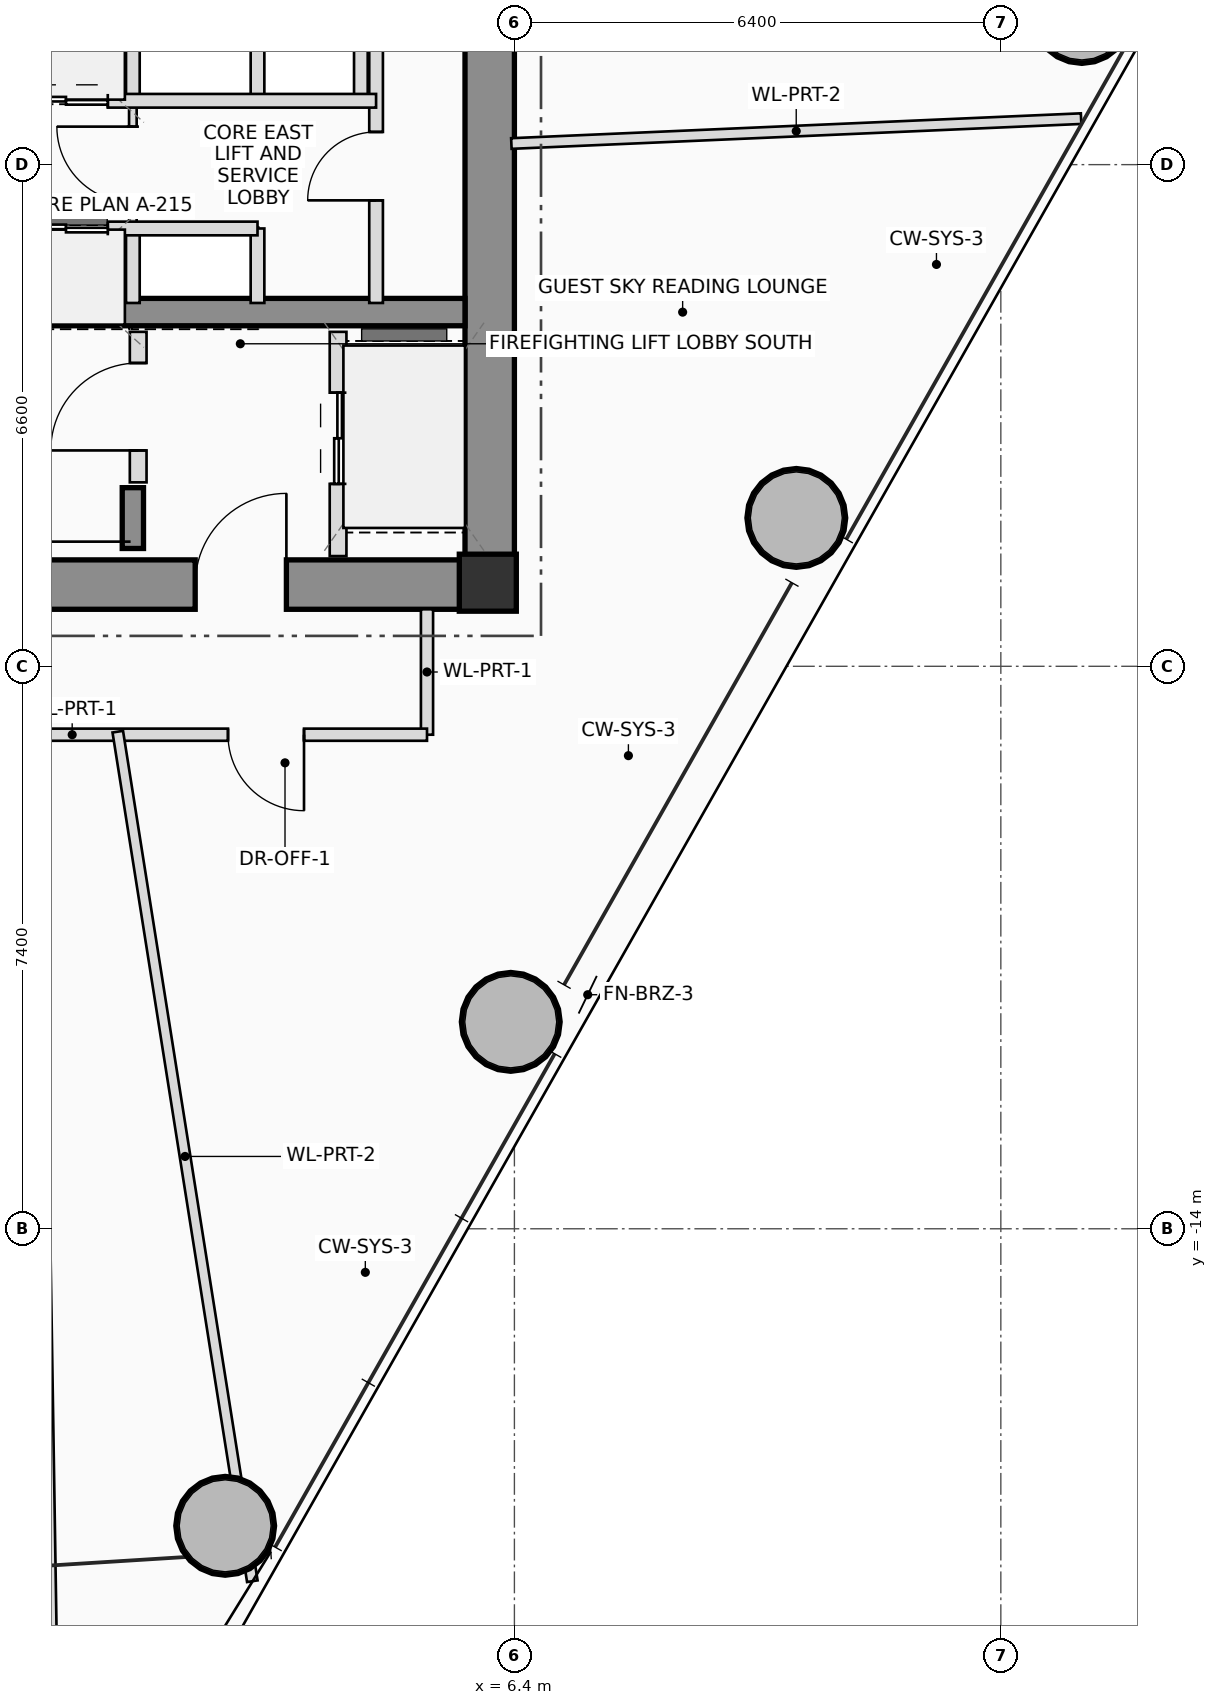
"""IFC4 building model, lengths in metres.
Left out: names, types, materials, properties, quantities, classifications, styles, units other than length and angle.
Written with IfcOpenShell. Run it as: python <this file> out.ifc"""

import sys

from ifc_helpers import new_model, si_unit, direction, frame, frame_2d, origin, origin_2d, place, context, subcontext, project, spatial, rectangle, hollow_circle, extrude, source, transform, mapped, element, fill, save


model = new_model("IFC4")
c1 = context("Model", 3, precision=1e-05, world=origin(), true_north=direction((0.0, 1.0)))
c2 = subcontext(c1, "Body", "Model", "MODEL_VIEW")
j1 = project(units=[si_unit("LENGTHUNIT", "METRE"), si_unit("PLANEANGLEUNIT", "RADIAN")], contexts=[c1])
p1 = place(None, origin())
s1 = spatial("IfcSite", under=j1, at=p1, CompositionType="ELEMENT")
p2 = place(p1, origin())
s2 = spatial("IfcBuilding", under=s1, at=p2, CompositionType="ELEMENT")
p3 = place(p2, frame((0.0, 0.0, 165.65)))
s3 = spatial("IfcBuildingStorey", under=s2, at=p3, CompositionType="ELEMENT", Elevation=165.65)
m1 = source(origin(), c2, "Body", "SweptSolid", [
    extrude(rectangle(XDim=0.75, YDim=0.75, at=origin_2d()), origin(), (0.0, 0.0, 1.0), 3.45),
])
p4 = place(p3, frame((6.05, -5.5, 0.0), z_axis=(0.0, 0.0, 1.0), x_axis=(1.0, 0.0, 0.0)))
e1 = element("IfcColumn", 1, at=p4, inside=s3, PredefinedType="COLUMN", context=c2, shape_type="MappedRepresentation", body=[
    mapped(m1, transform((0.0, 0.0, 0.0), scale=1.0)),
])
p5 = place(p3, frame((-6.4, -5.525, 0.0), z_axis=(0.0, 0.0, 1.0), x_axis=(1.0, 0.0, 0.0)))
e2 = element("IfcWall", 2, at=p5, inside=s3, PredefinedType="SHEAR", context=c2, shape_type="SweptSolid", body=[
    extrude(rectangle(XDim=12.8, YDim=0.65, at=frame_2d((6.4, 0.0))), origin(), (0.0, 0.0, 1.0), 3.45),
])
p6 = place(p5, frame((8.6, 0.0, 0.0)))
e3 = element("IfcOpeningElement", 3, at=p6, cuts=e2, PredefinedType="OPENING", context=c2, shape_type="SweptSolid", body=[
    extrude(rectangle(XDim=1.2, YDim=2.2, at=frame_2d((0.6, 1.1))), frame((0.0, 0.335, 0.0), z_axis=(0.0, -1.0, 0.0), x_axis=(1.0, 0.0, 0.0)), (0.0, 0.0, 1.0), 0.67),
])
p7 = place(p3, frame((6.075, -5.2, 0.0), z_axis=(0.0, 0.0, 1.0), x_axis=(0.0, 1.0, 0.0)))
e4 = element("IfcWall", 4, at=p7, inside=s3, PredefinedType="SHEAR", context=c2, shape_type="SweptSolid", body=[
    extrude(rectangle(XDim=10.4, YDim=0.65, at=frame_2d((5.2, 0.0))), origin(), (0.0, 0.0, 1.0), 3.45),
])
p8 = place(p3, frame((-5.75, -1.94, 0.0), z_axis=(0.0, 0.0, 1.0), x_axis=(1.0, 0.0, 0.0)))
e5 = element("IfcWall", 5, at=p8, inside=s3, PredefinedType="SHEAR", context=c2, shape_type="SweptSolid", body=[
    extrude(rectangle(XDim=11.5, YDim=0.36, at=frame_2d((5.75, 0.0))), origin(), (0.0, 0.0, 1.0), 3.45),
])
p9 = place(p3, frame((1.38, -5.05, 0.0), z_axis=(0.0, 0.0, 1.0), x_axis=(0.0, 1.0, 0.0)))
e6 = element("IfcWall", 6, at=p9, inside=s3, PredefinedType="SHEAR", context=c2, shape_type="SweptSolid", body=[
    extrude(rectangle(XDim=0.8, YDim=0.28, at=frame_2d((0.4, 0.0))), origin(), (0.0, 0.0, 1.0), 3.45),
])
m2 = source(origin(), c2, "Body", "SweptSolid", [
    extrude(hollow_circle(Radius=0.65, WallThickness=0.045, at=origin_2d()), origin(), (0.0, 0.0, 1.0), 3.45),
])
for number, where, z_axis, x_axis in (
    (7, (2.595, -17.908, 0.0), (0.0, 0.0, 1.0), (1.0, 0.0, 0.0)),
    (8, (6.352, -11.278, 0.0), (0.0, 0.0, 1.0), (1.0, 0.0, 0.0)),
    (9, (10.109, -4.648, 0.0), (0.0, 0.0, 1.0), (1.0, 0.0, 0.0)),
    (10, (13.866, 1.982, 0.0), (0.0, 0.0, 1.0), (1.0, 0.0, 0.0)),
):
    element("IfcColumn", number, at=place(p3, frame(where, z_axis=z_axis, x_axis=x_axis)), inside=s3, PredefinedType="COLUMN", context=c2, shape_type="MappedRepresentation", body=[
        mapped(m2, transform((0.0, 0.0, 0.0), scale=1.0)),
    ])
p10 = place(p3, frame((1.45, -4.18, 0.0), z_axis=(0.0, 0.0, 1.0), x_axis=(0.0, 1.0, 0.0)))
e11 = element("IfcWall", 11, at=p10, inside=s3, PredefinedType="PLUMBINGWALL", context=c2, shape_type="SweptSolid", body=[
    extrude(rectangle(XDim=1.98, YDim=0.22, at=frame_2d((0.99, 0.0))), origin(), (0.0, 0.0, 1.0), 3.25),
])
p11 = place(p10, frame((0.42, 0.0, 0.0)))
e12 = element("IfcOpeningElement", 12, at=p11, cuts=e11, PredefinedType="OPENING", context=c2, shape_type="SweptSolid", body=[
    extrude(rectangle(XDim=1.15, YDim=2.15, at=frame_2d((0.575, 1.075))), frame((0.0, 0.12, 0.0), z_axis=(0.0, -1.0, 0.0), x_axis=(1.0, 0.0, 0.0)), (0.0, 0.0, 1.0), 0.24),
])
p12 = place(p3, frame((4.08, -5.15, 0.0), z_axis=(0.0, 0.0, 1.0), x_axis=(0.0, 1.0, 0.0)))
e13 = element("IfcWall", 13, at=p12, inside=s3, PredefinedType="PLUMBINGWALL", context=c2, shape_type="SweptSolid", body=[
    extrude(rectangle(XDim=2.95, YDim=0.22, at=frame_2d((1.475, 0.0))), origin(), (0.0, 0.0, 1.0), 3.25),
])
p13 = place(p12, frame((0.95, 0.0, 0.0)))
e14 = element("IfcOpeningElement", 14, at=p13, cuts=e13, PredefinedType="OPENING", context=c2, shape_type="SweptSolid", body=[
    extrude(rectangle(XDim=1.2, YDim=2.25, at=frame_2d((0.6, 1.125))), frame((0.0, 0.12, 0.0), z_axis=(0.0, -1.0, 0.0), x_axis=(1.0, 0.0, 0.0)), (0.0, 0.0, 1.0), 0.24),
])
p14 = place(p3, frame((1.38, -0.84, 0.0), z_axis=(0.0, 0.0, 1.0), x_axis=(0.0, 1.0, 0.0)))
e15 = element("IfcWall", 15, at=p14, inside=s3, PredefinedType="PARTITIONING", context=c2, shape_type="SweptSolid", body=[
    extrude(rectangle(XDim=1.68, YDim=0.1, at=frame_2d((0.84, 0.0))), origin(), (0.0, 0.0, 1.0), 3.25),
])
p15 = place(p14, frame((0.34, 0.0, 0.0)))
e16 = element("IfcOpeningElement", 16, at=p15, cuts=e15, PredefinedType="OPENING", context=c2, shape_type="SweptSolid", body=[
    extrude(rectangle(XDim=1.0, YDim=2.25, at=frame_2d((0.5, 1.125))), frame((0.0, 0.06, 0.0), z_axis=(0.0, -1.0, 0.0), x_axis=(1.0, 0.0, 0.0)), (0.0, 0.0, 1.0), 0.12),
])
for number, where, z_axis, x_axis in (
    (17, (1.38, 0.84, 0.0), (0.0, 0.0, 1.0), (0.0, 1.0, 0.0)),
    (18, (1.38, -1.82, 0.0), (0.0, 0.0, 1.0), (0.0, 1.0, 0.0)),
    (19, (3.02, 0.84, 0.0), (0.0, 0.0, 1.0), (0.0, 1.0, 0.0)),
    (20, (4.38, 0.84, 0.0), (0.0, 0.0, 1.0), (0.0, 1.0, 0.0)),
    (21, (3.02, -1.82, 0.0), (0.0, 0.0, 1.0), (0.0, 1.0, 0.0)),
):
    element("IfcWall", number, at=place(p3, frame(where, z_axis=z_axis, x_axis=x_axis)), inside=s3, PredefinedType="PLUMBINGWALL", context=c2, shape_type="SweptSolid", body=[
        extrude(rectangle(XDim=0.98, YDim=0.18, at=frame_2d((0.49, 0.0))), origin(), (0.0, 0.0, 1.0), 3.25),
    ])
p16 = place(p3, frame((4.58, -1.82, 0.0), z_axis=(0.0, 0.0, 1.0), x_axis=(0.0, 1.0, 0.0)))
e22 = element("IfcWall", 22, at=p16, inside=s3, PredefinedType="PLUMBINGWALL", context=c2, shape_type="SweptSolid", body=[
    extrude(rectangle(XDim=3.64, YDim=0.18, at=frame_2d((1.82, 0.0))), origin(), (0.0, 0.0, 1.0), 3.25),
])
p17 = place(p16, frame((1.35, 0.0, 0.0)))
e23 = element("IfcOpeningElement", 23, at=p17, cuts=e22, PredefinedType="OPENING", context=c2, shape_type="SweptSolid", body=[
    extrude(rectangle(XDim=0.9, YDim=2.05, at=frame_2d((0.45, 1.025))), frame((0.0, 0.1, 0.0), z_axis=(0.0, -1.0, 0.0), x_axis=(1.0, 0.0, 0.0)), (0.0, 0.0, 1.0), 0.2),
])
p18 = place(p3, frame((-5.68, 0.84, 0.0), z_axis=(0.0, 0.0, 1.0), x_axis=(1.0, 0.0, 0.0)))
e24 = element("IfcWall", 24, at=p18, inside=s3, PredefinedType="PLUMBINGWALL", context=c2, shape_type="SweptSolid", body=[
    extrude(rectangle(XDim=10.26, YDim=0.18, at=frame_2d((5.13, 0.0))), origin(), (0.0, 0.0, 1.0), 3.25),
])
p19 = place(p18, frame((1.08, 0.0, 0.0)))
e25 = element("IfcOpeningElement", 25, at=p19, cuts=e24, PredefinedType="OPENING", context=c2, shape_type="SweptSolid", body=[
    extrude(rectangle(XDim=0.9, YDim=2.05, at=frame_2d((0.45, 1.025))), frame((0.0, 0.1, 0.0), z_axis=(0.0, -1.0, 0.0), x_axis=(1.0, 0.0, 0.0)), (0.0, 0.0, 1.0), 0.2),
])
p20 = place(p18, frame((3.93, 0.0, 0.0)))
e26 = element("IfcOpeningElement", 26, at=p20, cuts=e24, PredefinedType="OPENING", context=c2, shape_type="SweptSolid", body=[
    extrude(rectangle(XDim=1.1, YDim=2.2, at=frame_2d((0.55, 1.1))), frame((0.0, 0.1, 0.0), z_axis=(0.0, -1.0, 0.0), x_axis=(1.0, 0.0, 0.0)), (0.0, 0.0, 1.0), 0.2),
])
p21 = place(p18, frame((5.63, 0.0, 0.0)))
e27 = element("IfcOpeningElement", 27, at=p21, cuts=e24, PredefinedType="OPENING", context=c2, shape_type="SweptSolid", body=[
    extrude(rectangle(XDim=1.1, YDim=2.2, at=frame_2d((0.55, 1.1))), frame((0.0, 0.1, 0.0), z_axis=(0.0, -1.0, 0.0), x_axis=(1.0, 0.0, 0.0)), (0.0, 0.0, 1.0), 0.2),
])
p22 = place(p3, frame((-5.68, -0.84, 0.0), z_axis=(0.0, 0.0, 1.0), x_axis=(1.0, 0.0, 0.0)))
e28 = element("IfcWall", 28, at=p22, inside=s3, PredefinedType="PLUMBINGWALL", context=c2, shape_type="SweptSolid", body=[
    extrude(rectangle(XDim=8.7, YDim=0.18, at=frame_2d((4.35, 0.0))), origin(), (0.0, 0.0, 1.0), 3.25),
])
p23 = place(p22, frame((1.68, 0.0, 0.0)))
e29 = element("IfcOpeningElement", 29, at=p23, cuts=e28, PredefinedType="OPENING", context=c2, shape_type="SweptSolid", body=[
    extrude(rectangle(XDim=0.9, YDim=2.05, at=frame_2d((0.45, 1.025))), frame((0.0, 0.1, 0.0), z_axis=(0.0, -1.0, 0.0), x_axis=(1.0, 0.0, 0.0)), (0.0, 0.0, 1.0), 0.2),
])
p24 = place(p22, frame((3.93, 0.0, 0.0)))
e30 = element("IfcOpeningElement", 30, at=p24, cuts=e28, PredefinedType="OPENING", context=c2, shape_type="SweptSolid", body=[
    extrude(rectangle(XDim=1.1, YDim=2.2, at=frame_2d((0.55, 1.1))), frame((0.0, 0.1, 0.0), z_axis=(0.0, -1.0, 0.0), x_axis=(1.0, 0.0, 0.0)), (0.0, 0.0, 1.0), 0.2),
])
p25 = place(p22, frame((5.63, 0.0, 0.0)))
e31 = element("IfcOpeningElement", 31, at=p25, cuts=e28, PredefinedType="OPENING", context=c2, shape_type="SweptSolid", body=[
    extrude(rectangle(XDim=1.1, YDim=2.2, at=frame_2d((0.55, 1.1))), frame((0.0, 0.1, 0.0), z_axis=(0.0, -1.0, 0.0), x_axis=(1.0, 0.0, 0.0)), (0.0, 0.0, 1.0), 0.2),
])
p26 = place(p3, frame((5.25, -5.85, 0.0), z_axis=(0.0, 0.0, 1.0), x_axis=(0.0, -1.0, 0.0)))
e32 = element("IfcWall", 32, at=p26, inside=s3, PredefinedType="PARTITIONING", context=c2, shape_type="SweptSolid", body=[
    extrude(rectangle(XDim=1.65, YDim=0.16, at=frame_2d((0.825, 0.0))), origin(), (0.0, 0.0, 1.0), 3.25),
])
p27 = place(p3, frame((5.25, -7.5, 0.0), z_axis=(0.0, 0.0, 1.0), x_axis=(-1.0, 0.0, 0.0)))
e33 = element("IfcWall", 33, at=p27, inside=s3, PredefinedType="PARTITIONING", context=c2, shape_type="SweptSolid", body=[
    extrude(rectangle(XDim=11.61, YDim=0.16, at=frame_2d((5.805, 0.0))), origin(), (0.0, 0.0, 1.0), 2.605),
])
p28 = place(p27, frame((1.618, 0.0, 0.0)))
e34 = element("IfcOpeningElement", 34, at=p28, cuts=e33, PredefinedType="OPENING", context=c2, shape_type="SweptSolid", body=[
    extrude(rectangle(XDim=1.0, YDim=2.25, at=frame_2d((0.5, 1.125))), frame((0.0, 0.09, 0.0), z_axis=(0.0, -1.0, 0.0), x_axis=(1.0, 0.0, 0.0)), (0.0, 0.0, 1.0), 0.18),
])
p29 = place(p27, frame((6.719, 0.0, 0.0)))
e35 = element("IfcOpeningElement", 35, at=p29, cuts=e33, PredefinedType="OPENING", context=c2, shape_type="SweptSolid", body=[
    extrude(rectangle(XDim=1.0, YDim=2.25, at=frame_2d((0.5, 1.125))), frame((0.0, 0.09, 0.0), z_axis=(0.0, -1.0, 0.0), x_axis=(1.0, 0.0, 0.0)), (0.0, 0.0, 1.0), 0.18),
])
p30 = place(p3, frame((6.36, 0.278, 0.0), z_axis=(0.0, 0.0, 1.0), x_axis=(0.999047543566, 0.043634913719, 0.0)))
e36 = element("IfcWall", 36, at=p30, inside=s3, PredefinedType="PARTITIONING", context=c2, shape_type="SweptSolid", body=[
    extrude(rectangle(XDim=7.503, YDim=0.14, at=frame_2d((3.751, 0.0))), origin(), (0.0, 0.0, 1.0), 2.605),
])
p31 = place(p3, frame((0.118, -7.46, 0.0), z_axis=(0.0, 0.0, 1.0), x_axis=(0.015859383496, -0.999874232069, 0.0)))
e37 = element("IfcWall", 37, at=p31, inside=s3, PredefinedType="PARTITIONING", context=c2, shape_type="SweptSolid", body=[
    extrude(rectangle(XDim=13.655, YDim=0.14, at=frame_2d((6.827, 0.0))), origin(), (0.0, 0.0, 1.0), 2.765),
])
p32 = place(p3, frame((1.181, -7.46, 0.0), z_axis=(0.0, 0.0, 1.0), x_axis=(0.156458885844, -0.98768447241, 0.0)))
e38 = element("IfcWall", 38, at=p32, inside=s3, PredefinedType="PARTITIONING", context=c2, shape_type="SweptSolid", body=[
    extrude(rectangle(XDim=11.316, YDim=0.14, at=frame_2d((5.658, 0.0))), origin(), (0.0, 0.0, 1.0), 2.605),
])
p33 = place(p6, origin())
e39 = element("IfcDoor", 39, at=p33, inside=s3, OperationType="SINGLE_SWING_RIGHT", PredefinedType="DOOR", context=c2, shape_type="SweptSolid", body=[
    extrude(rectangle(XDim=1.2, YDim=2.2, at=frame_2d((0.6, 1.1))), frame((0.0, 0.025, 0.0), z_axis=(0.0, -1.0, 0.0), x_axis=(1.0, 0.0, 0.0)), (0.0, 0.0, 1.0), 0.05),
])
fill(e3, e39)
p34 = place(p11, origin())
e40 = element("IfcDoor", 40, at=p34, inside=s3, OperationType="SINGLE_SWING_LEFT", PredefinedType="DOOR", context=c2, shape_type="SweptSolid", body=[
    extrude(rectangle(XDim=1.15, YDim=2.15, at=frame_2d((0.575, 1.075))), frame((0.0, 0.025, 0.0), z_axis=(0.0, -1.0, 0.0), x_axis=(1.0, 0.0, 0.0)), (0.0, 0.0, 1.0), 0.05),
])
fill(e12, e40)
p35 = place(p13, origin())
e41 = element("IfcDoor", 41, at=p35, inside=s3, OperationType="DOUBLE_DOOR_SLIDING", PredefinedType="DOOR", context=c2, shape_type="SweptSolid", body=[
    extrude(rectangle(XDim=1.2, YDim=2.25, at=frame_2d((0.6, 1.125))), frame((0.0, 0.025, 0.0), z_axis=(0.0, -1.0, 0.0), x_axis=(1.0, 0.0, 0.0)), (0.0, 0.0, 1.0), 0.05),
])
fill(e14, e41)
p36 = place(p15, origin())
e42 = element("IfcDoor", 42, at=p36, inside=s3, OperationType="SINGLE_SWING_RIGHT", PredefinedType="DOOR", context=c2, shape_type="SweptSolid", body=[
    extrude(rectangle(XDim=1.0, YDim=2.25, at=frame_2d((0.5, 1.125))), frame((0.0, 0.025, 0.0), z_axis=(0.0, -1.0, 0.0), x_axis=(1.0, 0.0, 0.0)), (0.0, 0.0, 1.0), 0.05),
])
fill(e16, e42)
p37 = place(p17, origin())
e43 = element("IfcDoor", 43, at=p37, inside=s3, OperationType="SINGLE_SWING_LEFT", PredefinedType="DOOR", context=c2, shape_type="SweptSolid", body=[
    extrude(rectangle(XDim=0.9, YDim=2.05, at=frame_2d((0.45, 1.025))), frame((0.0, 0.025, 0.0), z_axis=(0.0, -1.0, 0.0), x_axis=(1.0, 0.0, 0.0)), (0.0, 0.0, 1.0), 0.05),
])
fill(e23, e43)
p38 = place(p21, origin())
e44 = element("IfcDoor", 44, at=p38, inside=s3, OperationType="DOUBLE_DOOR_SLIDING", PredefinedType="DOOR", context=c2, shape_type="SweptSolid", body=[
    extrude(rectangle(XDim=1.1, YDim=2.2, at=frame_2d((0.55, 1.1))), frame((0.0, 0.025, 0.0), z_axis=(0.0, -1.0, 0.0), x_axis=(1.0, 0.0, 0.0)), (0.0, 0.0, 1.0), 0.05),
])
fill(e27, e44)
p39 = place(p25, origin())
e45 = element("IfcDoor", 45, at=p39, inside=s3, OperationType="DOUBLE_DOOR_SLIDING", PredefinedType="DOOR", context=c2, shape_type="SweptSolid", body=[
    extrude(rectangle(XDim=1.1, YDim=2.2, at=frame_2d((0.55, 1.1))), frame((0.0, 0.025, 0.0), z_axis=(0.0, -1.0, 0.0), x_axis=(1.0, 0.0, 0.0)), (0.0, 0.0, 1.0), 0.05),
])
fill(e31, e45)
p40 = place(p28, origin())
e46 = element("IfcDoor", 46, at=p40, inside=s3, OperationType="SINGLE_SWING_LEFT", PredefinedType="DOOR", context=c2, shape_type="SweptSolid", body=[
    extrude(rectangle(XDim=1.0, YDim=2.25, at=frame_2d((0.5, 1.125))), frame((0.0, 0.025, 0.0), z_axis=(0.0, -1.0, 0.0), x_axis=(1.0, 0.0, 0.0)), (0.0, 0.0, 1.0), 0.05),
])
fill(e34, e46)
save(model, sys.argv[1])
